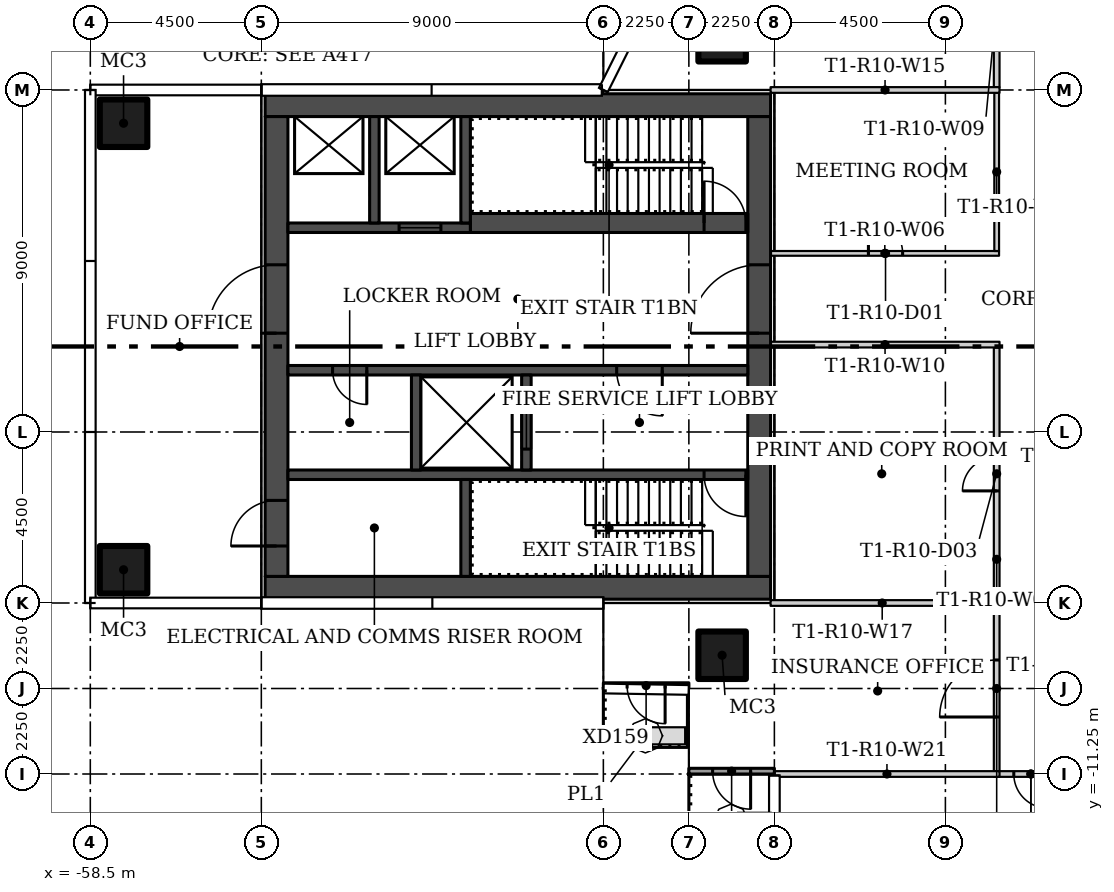
"""IFC4 building model, lengths in metres.
Left out: names, types, materials, properties, quantities, classifications, styles, units other than length and angle.
Written with IfcOpenShell. Run it as: python <this file> out.ifc"""

import sys

from ifc_helpers import new_model, si_unit, direction, frame, frame_2d, origin, origin_2d, place, context, subcontext, project, spatial, rectangle, hollow_rectangle, extrude, element, fill, save


model = new_model("IFC4")
c1 = context("Model", 3, precision=1e-05, world=origin(), true_north=direction((0.0, 1.0)))
c2 = subcontext(c1, "Body", "Model", "MODEL_VIEW")
j1 = project(units=[si_unit("LENGTHUNIT", "METRE"), si_unit("PLANEANGLEUNIT", "RADIAN")], contexts=[c1])
p1 = place(None, origin())
s1 = spatial("IfcSite", under=j1, at=p1, CompositionType="ELEMENT")
p2 = place(p1, origin())
s2 = spatial("IfcBuilding", under=s1, at=p2, CompositionType="ELEMENT")
p3 = place(p2, frame((0.0, 0.0, 105.3)))
s3 = spatial("IfcBuildingStorey", under=s2, at=p3, CompositionType="ELEMENT", Elevation=105.3)
for number, where in (
    (1, (-41.875, 8.125, 0.0)),
    (2, (-41.875, -8.125, 0.0)),
    (3, (-57.625, -5.875, 0.0)),
    (4, (-57.625, 5.875, 0.0)),
):
    element("IfcColumn", number, at=place(p3, frame(where)), inside=s3, PredefinedType="COLUMN", context=c2, shape_type="SweptSolid", body=[
        extrude(hollow_rectangle(XDim=1.25, YDim=1.25, WallThickness=0.05, at=origin_2d()), origin(), (0.0, 0.0, 1.0), 3.55),
    ])
p4 = place(p3, frame((-40.6, 2.45, 0.0)))
e5 = element("IfcWall", 5, at=p4, inside=s3, PredefinedType="PARTITIONING", context=c2, shape_type="SweptSolid", body=[
    extrude(rectangle(XDim=6.012, YDim=0.125, at=frame_2d((3.006, 0.0))), origin(), (0.0, 0.0, 1.0), 3.55),
])
p5 = place(p4, frame((2.575, 0.0, 0.0)))
e6 = element("IfcOpeningElement", 6, at=p5, cuts=e5, PredefinedType="OPENING", context=c2, shape_type="SweptSolid", body=[
    extrude(rectangle(XDim=0.9, YDim=2.1, at=frame_2d((0.45, 1.05))), frame((0.0, 0.073, 0.0), z_axis=(0.0, -1.0, 0.0), x_axis=(1.0, 0.0, 0.0)), (0.0, 0.0, 1.0), 0.145),
])
p6 = place(p3, frame((-34.65, 2.513, 0.0), z_axis=(0.0, 0.0, 1.0), x_axis=(0.0, 1.0, 0.0)))
e7 = element("IfcWall", 7, at=p6, inside=s3, PredefinedType="PARTITIONING", context=c2, shape_type="SweptSolid", body=[
    extrude(rectangle(XDim=4.162, YDim=0.125, at=frame_2d((2.081, 0.0))), origin(), (0.0, 0.0, 1.0), 3.55),
])
p7 = place(p3, frame((-34.65, -11.175, 0.0), z_axis=(0.0, 0.0, 1.0), x_axis=(0.0, 1.0, 0.0)))
e8 = element("IfcWall", 8, at=p7, inside=s3, PredefinedType="PARTITIONING", context=c2, shape_type="SweptSolid", body=[
    extrude(rectangle(XDim=11.15, YDim=0.15, at=frame_2d((5.575, 0.0))), origin(), (0.0, 0.0, 1.0), 3.55),
])
p8 = place(p7, frame((1.425, 0.0, 0.0)))
e9 = element("IfcOpeningElement", 9, at=p8, cuts=e8, PredefinedType="OPENING", context=c2, shape_type="SweptSolid", body=[
    extrude(rectangle(XDim=1.5, YDim=2.1, at=frame_2d((0.75, 1.05))), frame((0.0, 0.085, 0.0), z_axis=(0.0, -1.0, 0.0), x_axis=(1.0, 0.0, 0.0)), (0.0, 0.0, 1.0), 0.17),
])
p9 = place(p7, frame((7.375, 0.0, 0.0)))
e10 = element("IfcOpeningElement", 10, at=p9, cuts=e8, PredefinedType="OPENING", context=c2, shape_type="SweptSolid", body=[
    extrude(rectangle(XDim=0.9, YDim=2.1, at=frame_2d((0.45, 1.05))), frame((0.0, 0.085, 0.0), z_axis=(0.0, -1.0, 0.0), x_axis=(1.0, 0.0, 0.0)), (0.0, 0.0, 1.0), 0.17),
])
p10 = place(p3, frame((-34.65, 6.825, 0.0), z_axis=(0.0, 0.0, 1.0), x_axis=(0.0, 1.0, 0.0)))
e11 = element("IfcWall", 11, at=p10, inside=s3, PredefinedType="PARTITIONING", context=c2, shape_type="SweptSolid", body=[
    extrude(rectangle(XDim=4.35, YDim=0.15, at=frame_2d((2.175, 0.0))), origin(), (0.0, 0.0, 1.0), 3.55),
])
p11 = place(p10, frame((1.425, 0.0, 0.0)))
e12 = element("IfcOpeningElement", 12, at=p11, cuts=e11, PredefinedType="OPENING", context=c2, shape_type="SweptSolid", body=[
    extrude(rectangle(XDim=1.5, YDim=2.1, at=frame_2d((0.75, 1.05))), frame((0.0, 0.085, 0.0), z_axis=(0.0, -1.0, 0.0), x_axis=(1.0, 0.0, 0.0)), (0.0, 0.0, 1.0), 0.17),
])
p12 = place(p3, frame((-34.575, 0.05, 0.0), z_axis=(0.0, 0.0, 1.0), x_axis=(-1.0, 0.0, 0.0)))
e13 = element("IfcWall", 13, at=p12, inside=s3, PredefinedType="PARTITIONING", context=c2, shape_type="SweptSolid", body=[
    extrude(rectangle(XDim=6.025, YDim=0.15, at=frame_2d((3.012, 0.0))), origin(), (0.0, 0.0, 1.0), 3.55),
])
p13 = place(p3, frame((-32.775, -11.25, 0.0), z_axis=(0.0, 0.0, 1.0), x_axis=(-1.0, 0.0, 0.0)))
e14 = element("IfcWall", 14, at=p13, inside=s3, PredefinedType="PARTITIONING", context=c2, shape_type="SweptSolid", body=[
    extrude(rectangle(XDim=1.951, YDim=0.15, at=frame_2d((0.975, 0.0))), origin(), (0.0, 0.0, 1.0), 3.55),
])
p14 = place(p13, frame((0.525, 0.0, 0.0)))
e15 = element("IfcOpeningElement", 15, at=p14, cuts=e14, PredefinedType="OPENING", context=c2, shape_type="SweptSolid", body=[
    extrude(rectangle(XDim=0.9, YDim=2.1, at=frame_2d((0.45, 1.05))), frame((0.0, 0.085, 0.0), z_axis=(0.0, -1.0, 0.0), x_axis=(1.0, 0.0, 0.0)), (0.0, 0.0, 1.0), 0.17),
])
p15 = place(p3, frame((-34.575, 6.75, 0.0), z_axis=(0.0, 0.0, 1.0), x_axis=(-1.0, 0.0, 0.0)))
e16 = element("IfcWall", 16, at=p15, inside=s3, PredefinedType="PARTITIONING", context=c2, shape_type="SweptSolid", body=[
    extrude(rectangle(XDim=6.025, YDim=0.15, at=frame_2d((3.012, 0.0))), origin(), (0.0, 0.0, 1.0), 3.55),
])
p16 = place(p3, frame((-40.6, -6.75, 0.0)))
e17 = element("IfcWall", 17, at=p16, inside=s3, PredefinedType="PARTITIONING", context=c2, shape_type="SweptSolid", body=[
    extrude(rectangle(XDim=5.875, YDim=0.15, at=frame_2d((2.938, 0.0))), origin(), (0.0, 0.0, 1.0), 3.55),
])
p17 = place(p3, frame((-40.5, -11.25, 0.0)))
e18 = element("IfcWall", 18, at=p17, inside=s3, PredefinedType="PARTITIONING", context=c2, shape_type="SweptSolid", body=[
    extrude(rectangle(XDim=5.925, YDim=0.15, at=frame_2d((2.962, 0.0))), origin(), (0.0, 0.0, 1.0), 3.55),
])
p18 = place(p3, frame((-42.75, -8.925, 0.0), z_axis=(0.0, 0.0, 1.0), x_axis=(-1.0, 0.0, 0.0)))
e19 = element("IfcWall", 19, at=p18, inside=s3, PredefinedType="SOLIDWALL", context=c2, shape_type="SweptSolid", body=[
    extrude(rectangle(XDim=2.25, YDim=0.15, at=frame_2d((1.125, 0.0))), origin(), (0.0, 0.0, 1.0), 3.45),
])
p19 = place(p18, frame((0.625, 0.0, 0.0)))
e20 = element("IfcOpeningElement", 20, at=p19, cuts=e19, PredefinedType="OPENING", context=c2, shape_type="SweptSolid", body=[
    extrude(rectangle(XDim=1.0, YDim=2.4, at=frame_2d((0.5, 1.2))), frame((0.0, 0.085, 0.0), z_axis=(0.0, -1.0, 0.0), x_axis=(1.0, 0.0, 0.0)), (0.0, 0.0, 1.0), 0.17),
])
p20 = place(p3, frame((-40.5, -11.175, 0.0), z_axis=(0.0, 0.0, 1.0), x_axis=(-1.0, 0.0, 0.0)))
e21 = element("IfcWall", 21, at=p20, inside=s3, PredefinedType="SOLIDWALL", context=c2, shape_type="SweptSolid", body=[
    extrude(rectangle(XDim=2.25, YDim=0.15, at=frame_2d((1.125, 0.0))), origin(), (0.0, 0.0, 1.0), 3.45),
])
p21 = place(p20, frame((0.625, 0.0, 0.0)))
e22 = element("IfcOpeningElement", 22, at=p21, cuts=e21, PredefinedType="OPENING", context=c2, shape_type="SweptSolid", body=[
    extrude(rectangle(XDim=1.0, YDim=2.4, at=frame_2d((0.5, 1.2))), frame((0.0, 0.085, 0.0), z_axis=(0.0, -1.0, 0.0), x_axis=(1.0, 0.0, 0.0)), (0.0, 0.0, 1.0), 0.17),
])
for number, where, z_axis, x_axis in (
    (23, (-40.6, -6.35, 0.0), (0.0, 0.0, 1.0), (-1.0, 0.0, 0.0)),
    (24, (-40.6, 6.35, 0.0), (0.0, 0.0, 1.0), (-1.0, 0.0, 0.0)),
):
    element("IfcWall", number, at=place(p3, frame(where, z_axis=z_axis, x_axis=x_axis)), inside=s3, PredefinedType="SHEAR", context=c2, shape_type="SweptSolid", body=[
        extrude(rectangle(XDim=13.3, YDim=0.6, at=frame_2d((6.65, 0.0))), origin(), (0.0, 0.0, 1.0), 3.55),
    ])
p22 = place(p3, frame((-40.9, -6.05, 0.0), z_axis=(0.0, 0.0, 1.0), x_axis=(0.0, 1.0, 0.0)))
e25 = element("IfcWall", 25, at=p22, inside=s3, PredefinedType="SHEAR", context=c2, shape_type="SweptSolid", body=[
    extrude(rectangle(XDim=12.1, YDim=0.6, at=frame_2d((6.05, 0.0))), origin(), (0.0, 0.0, 1.0), 3.55),
])
p23 = place(p22, frame((6.4, 0.0, 0.0)))
e26 = element("IfcOpeningElement", 26, at=p23, cuts=e25, PredefinedType="OPENING", context=c2, shape_type="SweptSolid", body=[
    extrude(rectangle(XDim=1.8, YDim=2.4, at=frame_2d((0.9, 1.2))), frame((0.0, 0.31, 0.0), z_axis=(0.0, -1.0, 0.0), x_axis=(1.0, 0.0, 0.0)), (0.0, 0.0, 1.0), 0.62),
])
p24 = place(p3, frame((-53.6, -6.05, 0.0), z_axis=(0.0, 0.0, 1.0), x_axis=(0.0, 1.0, 0.0)))
e27 = element("IfcWall", 27, at=p24, inside=s3, PredefinedType="SHEAR", context=c2, shape_type="SweptSolid", body=[
    extrude(rectangle(XDim=12.1, YDim=0.6, at=frame_2d((6.05, 0.0))), origin(), (0.0, 0.0, 1.0), 3.55),
])
p25 = place(p24, frame((0.8, 0.0, 0.0)))
e28 = element("IfcOpeningElement", 28, at=p25, cuts=e27, PredefinedType="OPENING", context=c2, shape_type="SweptSolid", body=[
    extrude(rectangle(XDim=1.2, YDim=2.1, at=frame_2d((0.6, 1.05))), frame((0.0, 0.31, 0.0), z_axis=(0.0, -1.0, 0.0), x_axis=(1.0, 0.0, 0.0)), (0.0, 0.0, 1.0), 0.62),
])
p26 = place(p24, frame((6.4, 0.0, 0.0)))
e29 = element("IfcOpeningElement", 29, at=p26, cuts=e27, PredefinedType="OPENING", context=c2, shape_type="SweptSolid", body=[
    extrude(rectangle(XDim=1.8, YDim=2.4, at=frame_2d((0.9, 1.2))), frame((0.0, 0.31, 0.0), z_axis=(0.0, -1.0, 0.0), x_axis=(1.0, 0.0, 0.0)), (0.0, 0.0, 1.0), 0.62),
])
p27 = place(p3, frame((-41.2, -3.375, 0.0), z_axis=(0.0, 0.0, 1.0), x_axis=(-1.0, 0.0, 0.0)))
e30 = element("IfcWall", 30, at=p27, inside=s3, PredefinedType="SHEAR", context=c2, shape_type="SweptSolid", body=[
    extrude(rectangle(XDim=12.1, YDim=0.25, at=frame_2d((6.05, 0.0))), origin(), (0.0, 0.0, 1.0), 3.55),
])
p28 = place(p27, frame((0.05, 0.0, 0.0)))
e31 = element("IfcOpeningElement", 31, at=p28, cuts=e30, PredefinedType="OPENING", context=c2, shape_type="SweptSolid", body=[
    extrude(rectangle(XDim=1.1, YDim=2.1, at=frame_2d((0.55, 1.05))), frame((0.0, 0.135, 0.0), z_axis=(0.0, -1.0, 0.0), x_axis=(1.0, 0.0, 0.0)), (0.0, 0.0, 1.0), 0.27),
])
p29 = place(p3, frame((-48.625, -6.05, 0.0), z_axis=(0.0, 0.0, 1.0), x_axis=(0.0, 1.0, 0.0)))
e32 = element("IfcWall", 32, at=p29, inside=s3, PredefinedType="SHEAR", context=c2, shape_type="SweptSolid", body=[
    extrude(rectangle(XDim=2.55, YDim=0.25, at=frame_2d((1.275, 0.0))), origin(), (0.0, 0.0, 1.0), 3.55),
])
p30 = place(p3, frame((-41.2, -0.625, 0.0), z_axis=(0.0, 0.0, 1.0), x_axis=(-1.0, 0.0, 0.0)))
e33 = element("IfcWall", 33, at=p30, inside=s3, PredefinedType="SHEAR", context=c2, shape_type="SweptSolid", body=[
    extrude(rectangle(XDim=12.1, YDim=0.25, at=frame_2d((6.05, 0.0))), origin(), (0.0, 0.0, 1.0), 3.55),
])
p31 = place(p30, frame((2.25, 0.0, 0.0)))
e34 = element("IfcOpeningElement", 34, at=p31, cuts=e33, PredefinedType="OPENING", context=c2, shape_type="SweptSolid", body=[
    extrude(rectangle(XDim=1.2, YDim=2.1, at=frame_2d((0.6, 1.05))), frame((0.0, 0.135, 0.0), z_axis=(0.0, -1.0, 0.0), x_axis=(1.0, 0.0, 0.0)), (0.0, 0.0, 1.0), 0.27),
])
p32 = place(p30, frame((10.025, 0.0, 0.0)))
e35 = element("IfcOpeningElement", 35, at=p32, cuts=e33, PredefinedType="OPENING", context=c2, shape_type="SweptSolid", body=[
    extrude(rectangle(XDim=0.9, YDim=2.1, at=frame_2d((0.45, 1.05))), frame((0.0, 0.135, 0.0), z_axis=(0.0, -1.0, 0.0), x_axis=(1.0, 0.0, 0.0)), (0.0, 0.0, 1.0), 0.27),
])
p33 = place(p3, frame((-47.025, -3.25, 0.0), z_axis=(0.0, 0.0, 1.0), x_axis=(0.0, 1.0, 0.0)))
e36 = element("IfcWall", 36, at=p33, inside=s3, PredefinedType="SHEAR", context=c2, shape_type="SweptSolid", body=[
    extrude(rectangle(XDim=2.5, YDim=0.25, at=frame_2d((1.25, 0.0))), origin(), (0.0, 0.0, 1.0), 3.55),
])
p34 = place(p33, frame((0.55, 0.0, 0.0)))
e37 = element("IfcOpeningElement", 37, at=p34, cuts=e36, PredefinedType="OPENING", context=c2, shape_type="SweptSolid", body=[
    extrude(rectangle(XDim=1.4, YDim=2.4, at=frame_2d((0.7, 1.2))), frame((0.0, 0.135, 0.0), z_axis=(0.0, -1.0, 0.0), x_axis=(1.0, 0.0, 0.0)), (0.0, 0.0, 1.0), 0.27),
])
p35 = place(p3, frame((-49.925, -3.25, 0.0), z_axis=(0.0, 0.0, 1.0), x_axis=(0.0, 1.0, 0.0)))
e38 = element("IfcWall", 38, at=p35, inside=s3, PredefinedType="SHEAR", context=c2, shape_type="SweptSolid", body=[
    extrude(rectangle(XDim=2.5, YDim=0.25, at=frame_2d((1.25, 0.0))), origin(), (0.0, 0.0, 1.0), 3.55),
])
p36 = place(p3, frame((-48.5, 3.25, 0.0)))
e39 = element("IfcWall", 39, at=p36, inside=s3, PredefinedType="SHEAR", context=c2, shape_type="SweptSolid", body=[
    extrude(rectangle(XDim=7.3, YDim=0.5, at=frame_2d((3.65, 0.0))), origin(), (0.0, 0.0, 1.0), 3.55),
])
p37 = place(p36, frame((6.15, 0.0, 0.0)))
e40 = element("IfcOpeningElement", 40, at=p37, cuts=e39, PredefinedType="OPENING", context=c2, shape_type="SweptSolid", body=[
    extrude(rectangle(XDim=1.1, YDim=2.1, at=frame_2d((0.55, 1.05))), frame((0.0, 0.26, 0.0), z_axis=(0.0, -1.0, 0.0), x_axis=(1.0, 0.0, 0.0)), (0.0, 0.0, 1.0), 0.52),
])
p38 = place(p3, frame((-48.5, 3.125, 0.0), z_axis=(0.0, 0.0, 1.0), x_axis=(-1.0, 0.0, 0.0)))
e41 = element("IfcWall", 41, at=p38, inside=s3, PredefinedType="SHEAR", context=c2, shape_type="SweptSolid", body=[
    extrude(rectangle(XDim=4.8, YDim=0.25, at=frame_2d((2.4, 0.0))), origin(), (0.0, 0.0, 1.0), 3.55),
])
p39 = place(p38, frame((0.775, 0.0, 0.0)))
e42 = element("IfcOpeningElement", 42, at=p39, cuts=e41, PredefinedType="OPENING", context=c2, shape_type="SweptSolid", body=[
    extrude(rectangle(XDim=1.1, YDim=2.1, at=frame_2d((0.55, 1.05))), frame((0.0, 0.135, 0.0), z_axis=(0.0, -1.0, 0.0), x_axis=(1.0, 0.0, 0.0)), (0.0, 0.0, 1.0), 0.27),
])
for number, where, z_axis, x_axis in (
    (43, (-48.625, 3.25, 0.0), (0.0, 0.0, 1.0), (0.0, 1.0, 0.0)),
    (44, (-51.025, 3.25, 0.0), (0.0, 0.0, 1.0), (0.0, 1.0, 0.0)),
):
    element("IfcWall", number, at=place(p3, frame(where, z_axis=z_axis, x_axis=x_axis)), inside=s3, PredefinedType="SHEAR", context=c2, shape_type="SweptSolid", body=[
        extrude(rectangle(XDim=2.8, YDim=0.25, at=frame_2d((1.4, 0.0))), origin(), (0.0, 0.0, 1.0), 3.55),
    ])
p40 = place(p5, origin())
e45 = element("IfcDoor", 45, at=p40, inside=s3, OperationType="SINGLE_SWING_LEFT", PredefinedType="DOOR", context=c2, shape_type="SweptSolid", body=[
    extrude(rectangle(XDim=0.9, YDim=2.1, at=frame_2d((0.45, 1.05))), frame((0.0, 0.025, 0.0), z_axis=(0.0, -1.0, 0.0), x_axis=(1.0, 0.0, 0.0)), (0.0, 0.0, 1.0), 0.05),
])
fill(e6, e45)
p41 = place(p8, origin())
e46 = element("IfcDoor", 46, at=p41, inside=s3, OperationType="DOUBLE_DOOR_SINGLE_SWING", PredefinedType="DOOR", context=c2, shape_type="SweptSolid", body=[
    extrude(rectangle(XDim=1.5, YDim=2.1, at=frame_2d((0.75, 1.05))), frame((0.0, 0.025, 0.0), z_axis=(0.0, -1.0, 0.0), x_axis=(1.0, 0.0, 0.0)), (0.0, 0.0, 1.0), 0.05),
])
fill(e9, e46)
p42 = place(p9, origin())
e47 = element("IfcDoor", 47, at=p42, inside=s3, OperationType="SINGLE_SWING_RIGHT", PredefinedType="DOOR", context=c2, shape_type="SweptSolid", body=[
    extrude(rectangle(XDim=0.9, YDim=2.1, at=frame_2d((0.45, 1.05))), frame((0.0, 0.025, 0.0), z_axis=(0.0, -1.0, 0.0), x_axis=(1.0, 0.0, 0.0)), (0.0, 0.0, 1.0), 0.05),
])
fill(e10, e47)
p43 = place(p14, origin())
e48 = element("IfcDoor", 48, at=p43, inside=s3, OperationType="SINGLE_SWING_LEFT", PredefinedType="DOOR", context=c2, shape_type="SweptSolid", body=[
    extrude(rectangle(XDim=0.9, YDim=2.1, at=frame_2d((0.45, 1.05))), frame((0.0, 0.025, 0.0), z_axis=(0.0, -1.0, 0.0), x_axis=(1.0, 0.0, 0.0)), (0.0, 0.0, 1.0), 0.05),
])
fill(e15, e48)
p44 = place(p19, origin())
e49 = element("IfcDoor", 49, at=p44, inside=s3, OperationType="SINGLE_SWING_LEFT", PredefinedType="DOOR", context=c2, shape_type="SweptSolid", body=[
    extrude(rectangle(XDim=1.0, YDim=2.4, at=frame_2d((0.5, 1.2))), frame((0.0, 0.025, 0.0), z_axis=(0.0, -1.0, 0.0), x_axis=(1.0, 0.0, 0.0)), (0.0, 0.0, 1.0), 0.05),
])
fill(e20, e49)
p45 = place(p21, origin())
e50 = element("IfcDoor", 50, at=p45, inside=s3, OperationType="SINGLE_SWING_RIGHT", PredefinedType="DOOR", context=c2, shape_type="SweptSolid", body=[
    extrude(rectangle(XDim=1.0, YDim=2.4, at=frame_2d((0.5, 1.2))), frame((0.0, 0.025, 0.0), z_axis=(0.0, -1.0, 0.0), x_axis=(1.0, 0.0, 0.0)), (0.0, 0.0, 1.0), 0.05),
])
fill(e22, e50)
p46 = place(p23, origin())
e51 = element("IfcDoor", 51, at=p46, inside=s3, OperationType="DOUBLE_DOOR_SINGLE_SWING", PredefinedType="DOOR", context=c2, shape_type="SweptSolid", body=[
    extrude(rectangle(XDim=1.8, YDim=2.4, at=frame_2d((0.9, 1.2))), frame((0.0, 0.025, 0.0), z_axis=(0.0, -1.0, 0.0), x_axis=(1.0, 0.0, 0.0)), (0.0, 0.0, 1.0), 0.05),
])
fill(e26, e51)
p47 = place(p25, origin())
e52 = element("IfcDoor", 52, at=p47, inside=s3, OperationType="SINGLE_SWING_LEFT", PredefinedType="DOOR", context=c2, shape_type="SweptSolid", body=[
    extrude(rectangle(XDim=1.2, YDim=2.1, at=frame_2d((0.6, 1.05))), frame((0.0, 0.025, 0.0), z_axis=(0.0, -1.0, 0.0), x_axis=(1.0, 0.0, 0.0)), (0.0, 0.0, 1.0), 0.05),
])
fill(e28, e52)
p48 = place(p26, origin())
e53 = element("IfcDoor", 53, at=p48, inside=s3, OperationType="DOUBLE_DOOR_SINGLE_SWING", PredefinedType="DOOR", context=c2, shape_type="SweptSolid", body=[
    extrude(rectangle(XDim=1.8, YDim=2.4, at=frame_2d((0.9, 1.2))), frame((0.0, 0.025, 0.0), z_axis=(0.0, -1.0, 0.0), x_axis=(1.0, 0.0, 0.0)), (0.0, 0.0, 1.0), 0.05),
])
fill(e29, e53)
p49 = place(p28, origin())
e54 = element("IfcDoor", 54, at=p49, inside=s3, OperationType="SINGLE_SWING_LEFT", PredefinedType="DOOR", context=c2, shape_type="SweptSolid", body=[
    extrude(rectangle(XDim=1.1, YDim=2.1, at=frame_2d((0.55, 1.05))), frame((0.0, 0.025, 0.0), z_axis=(0.0, -1.0, 0.0), x_axis=(1.0, 0.0, 0.0)), (0.0, 0.0, 1.0), 0.05),
])
fill(e31, e54)
p50 = place(p31, origin())
e55 = element("IfcDoor", 55, at=p50, inside=s3, OperationType="SINGLE_SWING_LEFT", PredefinedType="DOOR", context=c2, shape_type="SweptSolid", body=[
    extrude(rectangle(XDim=1.2, YDim=2.1, at=frame_2d((0.6, 1.05))), frame((0.0, 0.025, 0.0), z_axis=(0.0, -1.0, 0.0), x_axis=(1.0, 0.0, 0.0)), (0.0, 0.0, 1.0), 0.05),
])
fill(e34, e55)
p51 = place(p32, origin())
e56 = element("IfcDoor", 56, at=p51, inside=s3, OperationType="SINGLE_SWING_RIGHT", PredefinedType="DOOR", context=c2, shape_type="SweptSolid", body=[
    extrude(rectangle(XDim=0.9, YDim=2.1, at=frame_2d((0.45, 1.05))), frame((0.0, 0.025, 0.0), z_axis=(0.0, -1.0, 0.0), x_axis=(1.0, 0.0, 0.0)), (0.0, 0.0, 1.0), 0.05),
])
fill(e35, e56)
p52 = place(p34, origin())
e57 = element("IfcDoor", 57, at=p52, inside=s3, OperationType="SLIDING_TO_LEFT", PredefinedType="DOOR", context=c2, shape_type="SweptSolid", body=[
    extrude(rectangle(XDim=1.4, YDim=2.4, at=frame_2d((0.7, 1.2))), frame((0.0, 0.025, 0.0), z_axis=(0.0, -1.0, 0.0), x_axis=(1.0, 0.0, 0.0)), (0.0, 0.0, 1.0), 0.05),
])
fill(e37, e57)
p53 = place(p37, origin())
e58 = element("IfcDoor", 58, at=p53, inside=s3, OperationType="SINGLE_SWING_RIGHT", PredefinedType="DOOR", context=c2, shape_type="SweptSolid", body=[
    extrude(rectangle(XDim=1.1, YDim=2.1, at=frame_2d((0.55, 1.05))), frame((0.0, 0.025, 0.0), z_axis=(0.0, -1.0, 0.0), x_axis=(1.0, 0.0, 0.0)), (0.0, 0.0, 1.0), 0.05),
])
fill(e40, e58)
p54 = place(p39, origin())
e59 = element("IfcDoor", 59, at=p54, inside=s3, OperationType="SLIDING_TO_LEFT", PredefinedType="DOOR", context=c2, shape_type="SweptSolid", body=[
    extrude(rectangle(XDim=1.1, YDim=2.1, at=frame_2d((0.55, 1.05))), frame((0.0, 0.025, 0.0), z_axis=(0.0, -1.0, 0.0), x_axis=(1.0, 0.0, 0.0)), (0.0, 0.0, 1.0), 0.05),
])
fill(e42, e59)
save(model, sys.argv[1])
